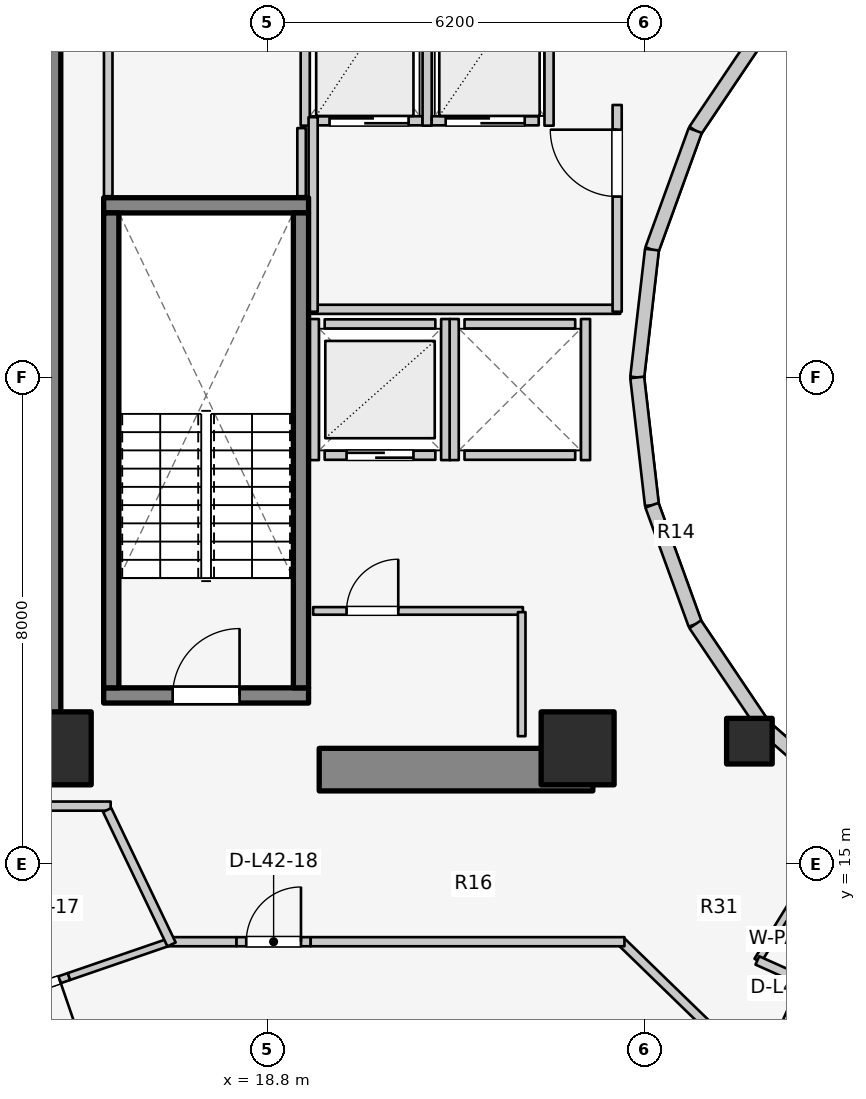
"""IFC4 building model, lengths in metres.
Left out: names, types, materials, properties, quantities, classifications, styles, units other than length and angle.
Written with IfcOpenShell. Run it as: python <this file> out.ifc"""

import sys

from ifc_helpers import new_model, si_unit, direction, frame, frame_2d, origin, origin_2d, place, context, subcontext, project, spatial, rectangle, extrude, element, fill, save


model = new_model("IFC4")
c1 = context("Model", 3, precision=1e-05, world=origin(), true_north=direction((0.0, 1.0)))
c2 = subcontext(c1, "Body", "Model", "MODEL_VIEW")
j1 = project(units=[si_unit("LENGTHUNIT", "METRE"), si_unit("PLANEANGLEUNIT", "RADIAN")], contexts=[c1])
p1 = place(None, origin())
s1 = spatial("IfcSite", under=j1, at=p1, CompositionType="ELEMENT")
p2 = place(p1, origin())
s2 = spatial("IfcBuilding", under=s1, at=p2, CompositionType="ELEMENT")
p3 = place(p2, frame((0.0, 0.0, 140.5)))
s3 = spatial("IfcBuildingStorey", under=s2, at=p3, CompositionType="ELEMENT", Elevation=140.5)
p4 = place(p3, frame((15.05, 17.05, 0.0), z_axis=(0.0, 0.0, 1.0), x_axis=(0.0, 1.0, 0.0)))
e1 = element("IfcWall", 1, at=p4, inside=s3, PredefinedType="SHEAR", context=c2, shape_type="SweptSolid", body=[
    extrude(rectangle(XDim=12.8, YDim=0.7, at=frame_2d((6.4, 0.0))), origin(), (0.0, 0.0, 1.0), 3.1),
])
p5 = place(p3, frame((19.65, 16.55, 0.0), z_axis=(0.0, 0.0, 1.0), x_axis=(1.0, 0.0, 0.0)))
e2 = element("IfcWall", 2, at=p5, inside=s3, PredefinedType="SHEAR", context=c2, shape_type="SweptSolid", body=[
    extrude(rectangle(XDim=4.5, YDim=0.7, at=frame_2d((2.25, 0.0))), origin(), (0.0, 0.0, 1.0), 3.1),
])
p6 = place(p3, frame((16.105, 17.77, 0.0), z_axis=(0.0, 0.0, 1.0), x_axis=(1.0, 0.0, 0.0)))
e3 = element("IfcWall", 3, at=p6, inside=s3, PredefinedType="SOLIDWALL", context=c2, shape_type="SweptSolid", body=[
    extrude(rectangle(XDim=3.37, YDim=0.25, at=frame_2d((1.685, 0.0))), origin(), (0.0, 0.0, 1.0), 3.1),
])
p7 = place(p6, frame((1.135, 0.0, 0.0)))
e4 = element("IfcOpeningElement", 4, at=p7, cuts=e3, PredefinedType="OPENING", context=c2, shape_type="SweptSolid", body=[
    extrude(rectangle(XDim=1.1, YDim=2.1, at=frame_2d((0.55, 1.05))), frame((0.0, 0.135, 0.0), z_axis=(0.0, -1.0, 0.0), x_axis=(1.0, 0.0, 0.0)), (0.0, 0.0, 1.0), 0.27),
])
p8 = place(p3, frame((16.105, 25.83, 0.0), z_axis=(0.0, 0.0, 1.0), x_axis=(1.0, 0.0, 0.0)))
e5 = element("IfcWall", 5, at=p8, inside=s3, PredefinedType="SOLIDWALL", context=c2, shape_type="SweptSolid", body=[
    extrude(rectangle(XDim=3.37, YDim=0.25, at=frame_2d((1.685, 0.0))), origin(), (0.0, 0.0, 1.0), 3.1),
])
for number, where, z_axis, x_axis in (
    (6, (16.23, 17.895, 0.0), (0.0, 0.0, 1.0), (0.0, 1.0, 0.0)),
    (7, (19.35, 17.895, 0.0), (0.0, 0.0, 1.0), (0.0, 1.0, 0.0)),
):
    element("IfcWall", number, at=place(p3, frame(where, z_axis=z_axis, x_axis=x_axis)), inside=s3, PredefinedType="SOLIDWALL", context=c2, shape_type="SweptSolid", body=[
        extrude(rectangle(XDim=7.81, YDim=0.25, at=frame_2d((3.905, 0.0))), origin(), (0.0, 0.0, 1.0), 3.1),
    ])
for number, where, z_axis, x_axis in (
    (8, (15.3, 16.9, 0.0), (0.0, 0.0, 1.0), (1.0, 0.0, 0.0)),
    (9, (23.9, 16.9, 0.0), (0.0, 0.0, 1.0), (1.0, 0.0, 0.0)),
):
    element("IfcColumn", number, at=place(p3, frame(where, z_axis=z_axis, x_axis=x_axis)), inside=s3, PredefinedType="COLUMN", context=c2, shape_type="SweptSolid", body=[
        extrude(rectangle(XDim=1.2, YDim=1.2, at=origin_2d()), origin(), (0.0, 0.0, 1.0), 3.1),
    ])
p9 = place(p3, frame((26.725, 17.018, 0.0), z_axis=(0.0, 0.0, 1.0), x_axis=(1.0, 0.0, 0.0)))
e10 = element("IfcColumn", 10, at=p9, inside=s3, PredefinedType="COLUMN", context=c2, shape_type="SweptSolid", body=[
    extrude(rectangle(XDim=0.75, YDim=0.75, at=origin_2d()), origin(), (0.0, 0.0, 1.0), 3.1),
])
p10 = place(p3, frame((26.965, 28.742, 0.0), z_axis=(0.0, 0.0, 1.0), x_axis=(-0.558197800898, -0.829707909492, 0.0)))
e11 = element("IfcWall", 11, at=p10, inside=s3, PredefinedType="STANDARD", context=c2, shape_type="SweptSolid", body=[
    extrude(rectangle(XDim=2.027, YDim=0.23, at=frame_2d((1.013, 0.0))), origin(), (0.0, 0.0, 1.0), 1.22),
])
p11 = place(p3, frame((25.834, 27.06, 0.0), z_axis=(0.0, 0.0, 1.0), x_axis=(-0.341423187295, -0.93990968033, 0.0)))
e12 = element("IfcWall", 12, at=p11, inside=s3, PredefinedType="STANDARD", context=c2, shape_type="SweptSolid", body=[
    extrude(rectangle(XDim=2.084, YDim=0.23, at=frame_2d((1.042, 0.0))), origin(), (0.0, 0.0, 1.0), 2.56),
])
for number, where, z_axis, x_axis in (
    (13, (25.123, 25.102, 0.0), (0.0, 0.0, 1.0), (-0.115, -0.993, 0.0)),
    (14, (24.88, 23.0, 0.0), (0.0, 0.0, 1.0), (0.115, -0.993, 0.0)),
):
    element("IfcWall", number, at=place(p3, frame(where, z_axis=z_axis, x_axis=x_axis)), inside=s3, PredefinedType="STANDARD", context=c2, shape_type="SweptSolid", body=[
        extrude(rectangle(XDim=2.115, YDim=0.23, at=frame_2d((1.058, 0.0))), origin(), (0.0, 0.0, 1.0), 2.56),
    ])
p12 = place(p3, frame((25.123, 20.898, 0.0), z_axis=(0.0, 0.0, 1.0), x_axis=(0.341423187295, -0.93990968033, 0.0)))
e15 = element("IfcWall", 15, at=p12, inside=s3, PredefinedType="STANDARD", context=c2, shape_type="SweptSolid", body=[
    extrude(rectangle(XDim=2.084, YDim=0.23, at=frame_2d((1.042, 0.0))), origin(), (0.0, 0.0, 1.0), 2.56),
])
p13 = place(p3, frame((25.834, 18.94, 0.0), z_axis=(0.0, 0.0, 1.0), x_axis=(0.558197800898, -0.829707909492, 0.0)))
e16 = element("IfcWall", 16, at=p13, inside=s3, PredefinedType="STANDARD", context=c2, shape_type="SweptSolid", body=[
    extrude(rectangle(XDim=2.027, YDim=0.23, at=frame_2d((1.013, 0.0))), origin(), (0.0, 0.0, 1.0), 1.22),
])
p14 = place(p3, frame((26.965, 17.258, 0.0), z_axis=(0.0, 0.0, 1.0), x_axis=(0.752576694707, -0.658504607869, 0.0)))
e17 = element("IfcWall", 17, at=p14, inside=s3, PredefinedType="STANDARD", context=c2, shape_type="SweptSolid", body=[
    extrude(rectangle(XDim=1.959, YDim=0.23, at=frame_2d((0.98, 0.0))), origin(), (0.0, 0.0, 1.0), 1.22),
])
p15 = place(p3, frame((12.381, 13.716, 0.0), z_axis=(0.0, 0.0, 1.0), x_axis=(0.727667301037, -0.68593024354, 0.0)))
e18 = element("IfcWall", 18, at=p15, inside=s3, PredefinedType="STANDARD", context=c2, shape_type="SweptSolid", body=[
    extrude(rectangle(XDim=4.604, YDim=0.26, at=frame_2d((2.302, 0.0))), origin(), (0.0, 0.0, 1.0), 1.22),
])
p16 = place(p15, frame((2.56, 0.0, 0.15)))
e19 = element("IfcOpeningElement", 19, at=p16, cuts=e18, PredefinedType="OPENING", context=c2, shape_type="SweptSolid", body=[
    extrude(rectangle(XDim=1.2, YDim=0.9, at=frame_2d((0.6, 0.45))), frame((0.0, 0.14, 0.0), z_axis=(0.0, -1.0, 0.0), x_axis=(1.0, 0.0, 0.0)), (0.0, 0.0, 1.0), 0.28),
])
p17 = place(p3, frame((19.74, 21.72, 0.0), z_axis=(0.0, 0.0, 1.0), x_axis=(1.0, 0.0, 0.0)))
e20 = element("IfcWall", 20, at=p17, inside=s3, PredefinedType="SOLIDWALL", context=c2, shape_type="SweptSolid", body=[
    extrude(rectangle(XDim=1.82, YDim=0.15, at=frame_2d((0.91, 0.0))), origin(), (0.0, 0.0, 1.0), 2.575),
])
p18 = place(p17, frame((0.36, 0.0, 0.0)))
e21 = element("IfcOpeningElement", 21, at=p18, cuts=e20, PredefinedType="OPENING", context=c2, shape_type="SweptSolid", body=[
    extrude(rectangle(XDim=1.1, YDim=2.1, at=frame_2d((0.55, 1.05))), frame((0.0, 0.085, 0.0), z_axis=(0.0, -1.0, 0.0), x_axis=(1.0, 0.0, 0.0)), (0.0, 0.0, 1.0), 0.17),
])
p19 = place(p3, frame((19.74, 23.88, 0.0), z_axis=(0.0, 0.0, 1.0), x_axis=(1.0, 0.0, 0.0)))
e22 = element("IfcWall", 22, at=p19, inside=s3, PredefinedType="SOLIDWALL", context=c2, shape_type="SweptSolid", body=[
    extrude(rectangle(XDim=1.82, YDim=0.15, at=frame_2d((0.91, 0.0))), origin(), (0.0, 0.0, 1.0), 2.575),
])
for number, where, z_axis, x_axis in (
    (23, (19.57, 21.64, 0.0), (0.0, 0.0, 1.0), (0.0, 1.0, 0.0)),
    (24, (21.73, 21.64, 0.0), (0.0, 0.0, 1.0), (0.0, 1.0, 0.0)),
):
    element("IfcWall", number, at=place(p3, frame(where, z_axis=z_axis, x_axis=x_axis)), inside=s3, PredefinedType="SOLIDWALL", context=c2, shape_type="SweptSolid", body=[
        extrude(rectangle(XDim=2.32, YDim=0.15, at=frame_2d((1.16, 0.0))), origin(), (0.0, 0.0, 1.0), 2.575),
    ])
for number, where, z_axis, x_axis in (
    (25, (22.04, 21.72, 0.0), (0.0, 0.0, 1.0), (1.0, 0.0, 0.0)),
    (26, (22.04, 23.88, 0.0), (0.0, 0.0, 1.0), (1.0, 0.0, 0.0)),
):
    element("IfcWall", number, at=place(p3, frame(where, z_axis=z_axis, x_axis=x_axis)), inside=s3, PredefinedType="SOLIDWALL", context=c2, shape_type="SweptSolid", body=[
        extrude(rectangle(XDim=1.82, YDim=0.15, at=frame_2d((0.91, 0.0))), origin(), (0.0, 0.0, 1.0), 2.12),
    ])
p20 = place(p3, frame((21.87, 21.64, 0.0), z_axis=(0.0, 0.0, 1.0), x_axis=(0.0, 1.0, 0.0)))
e27 = element("IfcWall", 27, at=p20, inside=s3, PredefinedType="SOLIDWALL", context=c2, shape_type="SweptSolid", body=[
    extrude(rectangle(XDim=2.32, YDim=0.15, at=frame_2d((1.16, 0.0))), origin(), (0.0, 0.0, 1.0), 2.575),
])
p21 = place(p3, frame((24.03, 21.64, 0.0), z_axis=(0.0, 0.0, 1.0), x_axis=(0.0, 1.0, 0.0)))
e28 = element("IfcWall", 28, at=p21, inside=s3, PredefinedType="SOLIDWALL", context=c2, shape_type="SweptSolid", body=[
    extrude(rectangle(XDim=2.32, YDim=0.15, at=frame_2d((1.16, 0.0))), origin(), (0.0, 0.0, 1.0), 2.12),
])
p22 = place(p3, frame((19.59, 27.22, 0.0), z_axis=(0.0, 0.0, 1.0), x_axis=(1.0, 0.0, 0.0)))
e29 = element("IfcWall", 29, at=p22, inside=s3, PredefinedType="SOLIDWALL", context=c2, shape_type="SweptSolid", body=[
    extrude(rectangle(XDim=1.76, YDim=0.15, at=frame_2d((0.88, 0.0))), origin(), (0.0, 0.0, 1.0), 2.575),
])
p23 = place(p22, frame((0.23, 0.0, 0.0)))
e30 = element("IfcOpeningElement", 30, at=p23, cuts=e29, PredefinedType="OPENING", context=c2, shape_type="SweptSolid", body=[
    extrude(rectangle(XDim=1.3, YDim=2.1, at=frame_2d((0.65, 1.05))), frame((0.0, 0.085, 0.0), z_axis=(0.0, -1.0, 0.0), x_axis=(1.0, 0.0, 0.0)), (0.0, 0.0, 1.0), 0.17),
])
for number, where, z_axis, x_axis in (
    (31, (19.42, 27.14, 0.0), (0.0, 0.0, 1.0), (0.0, 1.0, 0.0)),
    (32, (21.425, 27.14, 0.0), (0.0, 0.0, 1.0), (0.0, 1.0, 0.0)),
):
    element("IfcWall", number, at=place(p3, frame(where, z_axis=z_axis, x_axis=x_axis)), inside=s3, PredefinedType="SOLIDWALL", context=c2, shape_type="SweptSolid", body=[
        extrude(rectangle(XDim=2.72, YDim=0.15, at=frame_2d((1.36, 0.0))), origin(), (0.0, 0.0, 1.0), 2.575),
    ])
p24 = place(p3, frame((21.5, 27.22, 0.0), z_axis=(0.0, 0.0, 1.0), x_axis=(1.0, 0.0, 0.0)))
e33 = element("IfcWall", 33, at=p24, inside=s3, PredefinedType="SOLIDWALL", context=c2, shape_type="SweptSolid", body=[
    extrude(rectangle(XDim=1.76, YDim=0.15, at=frame_2d((0.88, 0.0))), origin(), (0.0, 0.0, 1.0), 2.575),
])
p25 = place(p24, frame((0.23, 0.0, 0.0)))
e34 = element("IfcOpeningElement", 34, at=p25, cuts=e33, PredefinedType="OPENING", context=c2, shape_type="SweptSolid", body=[
    extrude(rectangle(XDim=1.3, YDim=2.1, at=frame_2d((0.65, 1.05))), frame((0.0, 0.085, 0.0), z_axis=(0.0, -1.0, 0.0), x_axis=(1.0, 0.0, 0.0)), (0.0, 0.0, 1.0), 0.17),
])
p26 = place(p3, frame((23.43, 27.14, 0.0), z_axis=(0.0, 0.0, 1.0), x_axis=(0.0, 1.0, 0.0)))
e35 = element("IfcWall", 35, at=p26, inside=s3, PredefinedType="SOLIDWALL", context=c2, shape_type="SweptSolid", body=[
    extrude(rectangle(XDim=2.72, YDim=0.15, at=frame_2d((1.36, 0.0))), origin(), (0.0, 0.0, 1.0), 2.575),
])
p27 = place(p3, frame((19.52, 24.12, 0.0), z_axis=(0.0, 0.0, 1.0), x_axis=(1.0, 0.0, 0.0)))
e36 = element("IfcWall", 36, at=p27, inside=s3, PredefinedType="PARTITIONING", context=c2, shape_type="SweptSolid", body=[
    extrude(rectangle(XDim=5.08, YDim=0.15, at=frame_2d((2.54, 0.0))), origin(), (0.0, 0.0, 1.0), 2.12),
])
p28 = place(p3, frame((19.55, 24.08, 0.0), z_axis=(0.0, 0.0, 1.0), x_axis=(0.0, 1.0, 0.0)))
e37 = element("IfcWall", 37, at=p28, inside=s3, PredefinedType="PARTITIONING", context=c2, shape_type="SweptSolid", body=[
    extrude(rectangle(XDim=3.2, YDim=0.15, at=frame_2d((1.6, 0.0))), origin(), (0.0, 0.0, 1.0), 2.575),
])
p29 = place(p3, frame((24.55, 24.08, 0.0), z_axis=(0.0, 0.0, 1.0), x_axis=(0.0, 1.0, 0.0)))
e38 = element("IfcWall", 38, at=p29, inside=s3, PredefinedType="PARTITIONING", context=c2, shape_type="SweptSolid", body=[
    extrude(rectangle(XDim=3.4, YDim=0.15, at=frame_2d((1.7, 0.0))), origin(), (0.0, 0.0, 1.0), 2.575),
])
p30 = place(p29, frame((1.894, 0.0, 0.0)))
e39 = element("IfcOpeningElement", 39, at=p30, cuts=e38, PredefinedType="OPENING", context=c2, shape_type="SweptSolid", body=[
    extrude(rectangle(XDim=1.1, YDim=2.1, at=frame_2d((0.55, 1.05))), frame((0.0, 0.085, 0.0), z_axis=(0.0, -1.0, 0.0), x_axis=(1.0, 0.0, 0.0)), (0.0, 0.0, 1.0), 0.17),
])
p31 = place(p3, frame((19.55, 19.16, 0.0), z_axis=(0.0, 0.0, 1.0), x_axis=(1.0, 0.0, 0.0)))
e40 = element("IfcWall", 40, at=p31, inside=s3, PredefinedType="PARTITIONING", context=c2, shape_type="SweptSolid", body=[
    extrude(rectangle(XDim=3.45, YDim=0.125, at=frame_2d((1.725, 0.0))), origin(), (0.0, 0.0, 1.0), 2.12),
])
p32 = place(p31, frame((0.55, 0.0, 0.0)))
e41 = element("IfcOpeningElement", 41, at=p32, cuts=e40, PredefinedType="OPENING", context=c2, shape_type="SweptSolid", body=[
    extrude(rectangle(XDim=0.85, YDim=2.05, at=frame_2d((0.425, 1.025))), frame((0.0, 0.073, 0.0), z_axis=(0.0, -1.0, 0.0), x_axis=(1.0, 0.0, 0.0)), (0.0, 0.0, 1.0), 0.145),
])
p33 = place(p3, frame((22.98, 17.1, 0.0), z_axis=(0.0, 0.0, 1.0), x_axis=(0.0, 1.0, 0.0)))
e42 = element("IfcWall", 42, at=p33, inside=s3, PredefinedType="PARTITIONING", context=c2, shape_type="SweptSolid", body=[
    extrude(rectangle(XDim=2.04, YDim=0.125, at=frame_2d((1.02, 0.0))), origin(), (0.0, 0.0, 1.0), 2.575),
])
p34 = place(p3, frame((16.18, 25.98, 0.0), z_axis=(0.0, 0.0, 1.0), x_axis=(0.0, 1.0, 0.0)))
e43 = element("IfcWall", 43, at=p34, inside=s3, PredefinedType="PLUMBINGWALL", context=c2, shape_type="SweptSolid", body=[
    extrude(rectangle(XDim=3.88, YDim=0.14, at=frame_2d((1.94, 0.0))), origin(), (0.0, 0.0, 1.0), 2.575),
])
p35 = place(p3, frame((19.36, 25.98, 0.0), z_axis=(0.0, 0.0, 1.0), x_axis=(0.0, 1.0, 0.0)))
e44 = element("IfcWall", 44, at=p35, inside=s3, PredefinedType="PLUMBINGWALL", context=c2, shape_type="SweptSolid", body=[
    extrude(rectangle(XDim=1.12, YDim=0.14, at=frame_2d((0.56, 0.0))), origin(), (0.0, 0.0, 1.0), 2.575),
])
p36 = place(p3, frame((10.96, 15.95, 0.0), z_axis=(0.0, 0.0, 1.0), x_axis=(1.0, 0.0, 0.0)))
e45 = element("IfcWall", 45, at=p36, inside=s3, PredefinedType="PARTITIONING", context=c2, shape_type="SweptSolid", body=[
    extrude(rectangle(XDim=5.26, YDim=0.15, at=frame_2d((2.63, 0.0))), origin(), (0.0, 0.0, 1.0), 1.22),
])
p37 = place(p3, frame((17.247, 13.736, 0.0), z_axis=(0.0, 0.0, 1.0), x_axis=(-0.945652975294, -0.325177567366, 0.0)))
e46 = element("IfcWall", 46, at=p37, inside=s3, PredefinedType="MOVABLE", context=c2, shape_type="SweptSolid", body=[
    extrude(rectangle(XDim=1.814, YDim=0.12, at=frame_2d((0.907, 0.0))), origin(), (0.0, 0.0, 1.0), 1.22),
])
p38 = place(p3, frame((15.532, 13.146, 0.0), z_axis=(0.0, 0.0, 1.0), x_axis=(-0.945742719509, -0.324916463874, 0.0)))
e47 = element("IfcWall", 47, at=p38, inside=s3, PredefinedType="MOVABLE", context=c2, shape_type="SweptSolid", body=[
    extrude(rectangle(XDim=1.17, YDim=0.12, at=frame_2d((0.585, 0.0))), origin(), (0.0, 0.0, 1.0), 2.11),
])
p39 = place(p38, frame((0.16, 0.0, 0.0)))
e48 = element("IfcOpeningElement", 48, at=p39, cuts=e47, PredefinedType="OPENING", context=c2, shape_type="SweptSolid", body=[
    extrude(rectangle(XDim=0.85, YDim=2.05, at=frame_2d((0.425, 1.025))), frame((0.0, 0.07, 0.0), z_axis=(0.0, -1.0, 0.0), x_axis=(1.0, 0.0, 0.0)), (0.0, 0.0, 1.0), 0.14),
])
p40 = place(p3, frame((26.133, 12.251, 0.0), z_axis=(0.0, 0.0, 1.0), x_axis=(-0.717419568599, 0.696641344302, 0.0)))
e49 = element("IfcWall", 49, at=p40, inside=s3, PredefinedType="PARTITIONING", context=c2, shape_type="SweptSolid", body=[
    extrude(rectangle(XDim=2.138, YDim=0.15, at=frame_2d((1.069, 0.0))), origin(), (0.0, 0.0, 1.0), 2.019),
])
p41 = place(p3, frame((17.15, 13.72, 0.0), z_axis=(0.0, 0.0, 1.0), x_axis=(1.0, 0.0, 0.0)))
e50 = element("IfcWall", 50, at=p41, inside=s3, PredefinedType="PARTITIONING", context=c2, shape_type="SweptSolid", body=[
    extrude(rectangle(XDim=1.14, YDim=0.15, at=frame_2d((0.57, 0.0))), origin(), (0.0, 0.0, 1.0), 2.575),
])
p42 = place(p3, frame((18.29, 13.72, 0.0), z_axis=(0.0, 0.0, 1.0), x_axis=(1.0, 0.0, 0.0)))
e51 = element("IfcWall", 51, at=p42, inside=s3, PredefinedType="PARTITIONING", context=c2, shape_type="SweptSolid", body=[
    extrude(rectangle(XDim=1.22, YDim=0.15, at=frame_2d((0.61, 0.0))), origin(), (0.0, 0.0, 1.0), 2.575),
])
p43 = place(p42, frame((0.16, 0.0, 0.0)))
e52 = element("IfcOpeningElement", 52, at=p43, cuts=e51, PredefinedType="OPENING", context=c2, shape_type="SweptSolid", body=[
    extrude(rectangle(XDim=0.9, YDim=2.1, at=frame_2d((0.45, 1.05))), frame((0.0, 0.085, 0.0), z_axis=(0.0, -1.0, 0.0), x_axis=(1.0, 0.0, 0.0)), (0.0, 0.0, 1.0), 0.17),
])
p44 = place(p3, frame((19.51, 13.72, 0.0), z_axis=(0.0, 0.0, 1.0), x_axis=(1.0, 0.0, 0.0)))
e53 = element("IfcWall", 53, at=p44, inside=s3, PredefinedType="PARTITIONING", context=c2, shape_type="SweptSolid", body=[
    extrude(rectangle(XDim=5.16, YDim=0.15, at=frame_2d((2.58, 0.0))), origin(), (0.0, 0.0, 1.0), 2.019),
])
p45 = place(p3, frame((17.222, 13.675, 0.0), z_axis=(0.0, 0.0, 1.0), x_axis=(-0.431973389813, 0.901886351207, 0.0)))
e54 = element("IfcWall", 54, at=p45, inside=s3, PredefinedType="PARTITIONING", context=c2, shape_type="SweptSolid", body=[
    extrude(rectangle(XDim=2.452, YDim=0.15, at=frame_2d((1.226, 0.0))), origin(), (0.0, 0.0, 1.0), 2.575),
])
p46 = place(p3, frame((28.45, 15.985, 0.0), z_axis=(0.0, 0.0, 1.0), x_axis=(-0.524565340045, -0.851370192116, 0.0)))
e55 = element("IfcWall", 55, at=p46, inside=s3, PredefinedType="PARTITIONING", context=c2, shape_type="SweptSolid", body=[
    extrude(rectangle(XDim=3.027, YDim=0.125, at=frame_2d((1.514, 0.0))), origin(), (0.0, 0.0, 1.0), 2.019),
])
p47 = place(p3, frame((26.856, 13.412, 0.0), z_axis=(0.0, 0.0, 1.0), x_axis=(0.912985265053, -0.407992531545, 0.0)))
e56 = element("IfcWall", 56, at=p47, inside=s3, PredefinedType="PARTITIONING", context=c2, shape_type="SweptSolid", body=[
    extrude(rectangle(XDim=2.723, YDim=0.15, at=frame_2d((1.362, 0.0))), origin(), (0.0, 0.0, 1.0), 2.019),
])
p48 = place(p7, origin())
e57 = element("IfcDoor", 57, at=p48, inside=s3, OperationType="SINGLE_SWING_RIGHT", PredefinedType="DOOR", context=c2, shape_type="SweptSolid", body=[
    extrude(rectangle(XDim=1.1, YDim=2.1, at=frame_2d((0.55, 1.05))), frame((0.0, 0.025, 0.0), z_axis=(0.0, -1.0, 0.0), x_axis=(1.0, 0.0, 0.0)), (0.0, 0.0, 1.0), 0.05),
])
fill(e4, e57)
p49 = place(p18, origin())
e58 = element("IfcDoor", 58, at=p49, inside=s3, OperationType="DOUBLE_DOOR_SLIDING", PredefinedType="DOOR", context=c2, shape_type="SweptSolid", body=[
    extrude(rectangle(XDim=1.1, YDim=2.1, at=frame_2d((0.55, 1.05))), frame((0.0, 0.025, 0.0), z_axis=(0.0, -1.0, 0.0), x_axis=(1.0, 0.0, 0.0)), (0.0, 0.0, 1.0), 0.05),
])
fill(e21, e58)
p50 = place(p23, origin())
e59 = element("IfcDoor", 59, at=p50, inside=s3, OperationType="DOUBLE_DOOR_SLIDING", PredefinedType="DOOR", context=c2, shape_type="SweptSolid", body=[
    extrude(rectangle(XDim=1.3, YDim=2.1, at=frame_2d((0.65, 1.05))), frame((0.0, 0.025, 0.0), z_axis=(0.0, -1.0, 0.0), x_axis=(1.0, 0.0, 0.0)), (0.0, 0.0, 1.0), 0.05),
])
fill(e30, e59)
p51 = place(p25, origin())
e60 = element("IfcDoor", 60, at=p51, inside=s3, OperationType="DOUBLE_DOOR_SLIDING", PredefinedType="DOOR", context=c2, shape_type="SweptSolid", body=[
    extrude(rectangle(XDim=1.3, YDim=2.1, at=frame_2d((0.65, 1.05))), frame((0.0, 0.025, 0.0), z_axis=(0.0, -1.0, 0.0), x_axis=(1.0, 0.0, 0.0)), (0.0, 0.0, 1.0), 0.05),
])
fill(e34, e60)
p52 = place(p30, origin())
e61 = element("IfcDoor", 61, at=p52, inside=s3, OperationType="SINGLE_SWING_RIGHT", PredefinedType="DOOR", context=c2, shape_type="SweptSolid", body=[
    extrude(rectangle(XDim=1.1, YDim=2.1, at=frame_2d((0.55, 1.05))), frame((0.0, 0.025, 0.0), z_axis=(0.0, -1.0, 0.0), x_axis=(1.0, 0.0, 0.0)), (0.0, 0.0, 1.0), 0.05),
])
fill(e39, e61)
p53 = place(p32, origin())
e62 = element("IfcDoor", 62, at=p53, inside=s3, OperationType="SINGLE_SWING_RIGHT", PredefinedType="DOOR", context=c2, shape_type="SweptSolid", body=[
    extrude(rectangle(XDim=0.85, YDim=2.05, at=frame_2d((0.425, 1.025))), frame((0.0, 0.025, 0.0), z_axis=(0.0, -1.0, 0.0), x_axis=(1.0, 0.0, 0.0)), (0.0, 0.0, 1.0), 0.05),
])
fill(e41, e62)
p54 = place(p39, origin())
e63 = element("IfcDoor", 63, at=p54, inside=s3, OperationType="SINGLE_SWING_LEFT", PredefinedType="DOOR", context=c2, shape_type="SweptSolid", body=[
    extrude(rectangle(XDim=0.85, YDim=2.05, at=frame_2d((0.425, 1.025))), frame((0.0, 0.025, 0.0), z_axis=(0.0, -1.0, 0.0), x_axis=(1.0, 0.0, 0.0)), (0.0, 0.0, 1.0), 0.05),
])
fill(e48, e63)
p55 = place(p43, origin())
e64 = element("IfcDoor", 64, at=p55, inside=s3, OperationType="SINGLE_SWING_RIGHT", PredefinedType="DOOR", context=c2, shape_type="SweptSolid", body=[
    extrude(rectangle(XDim=0.9, YDim=2.1, at=frame_2d((0.45, 1.05))), frame((0.0, 0.025, 0.0), z_axis=(0.0, -1.0, 0.0), x_axis=(1.0, 0.0, 0.0)), (0.0, 0.0, 1.0), 0.05),
])
fill(e52, e64)
save(model, sys.argv[1])
